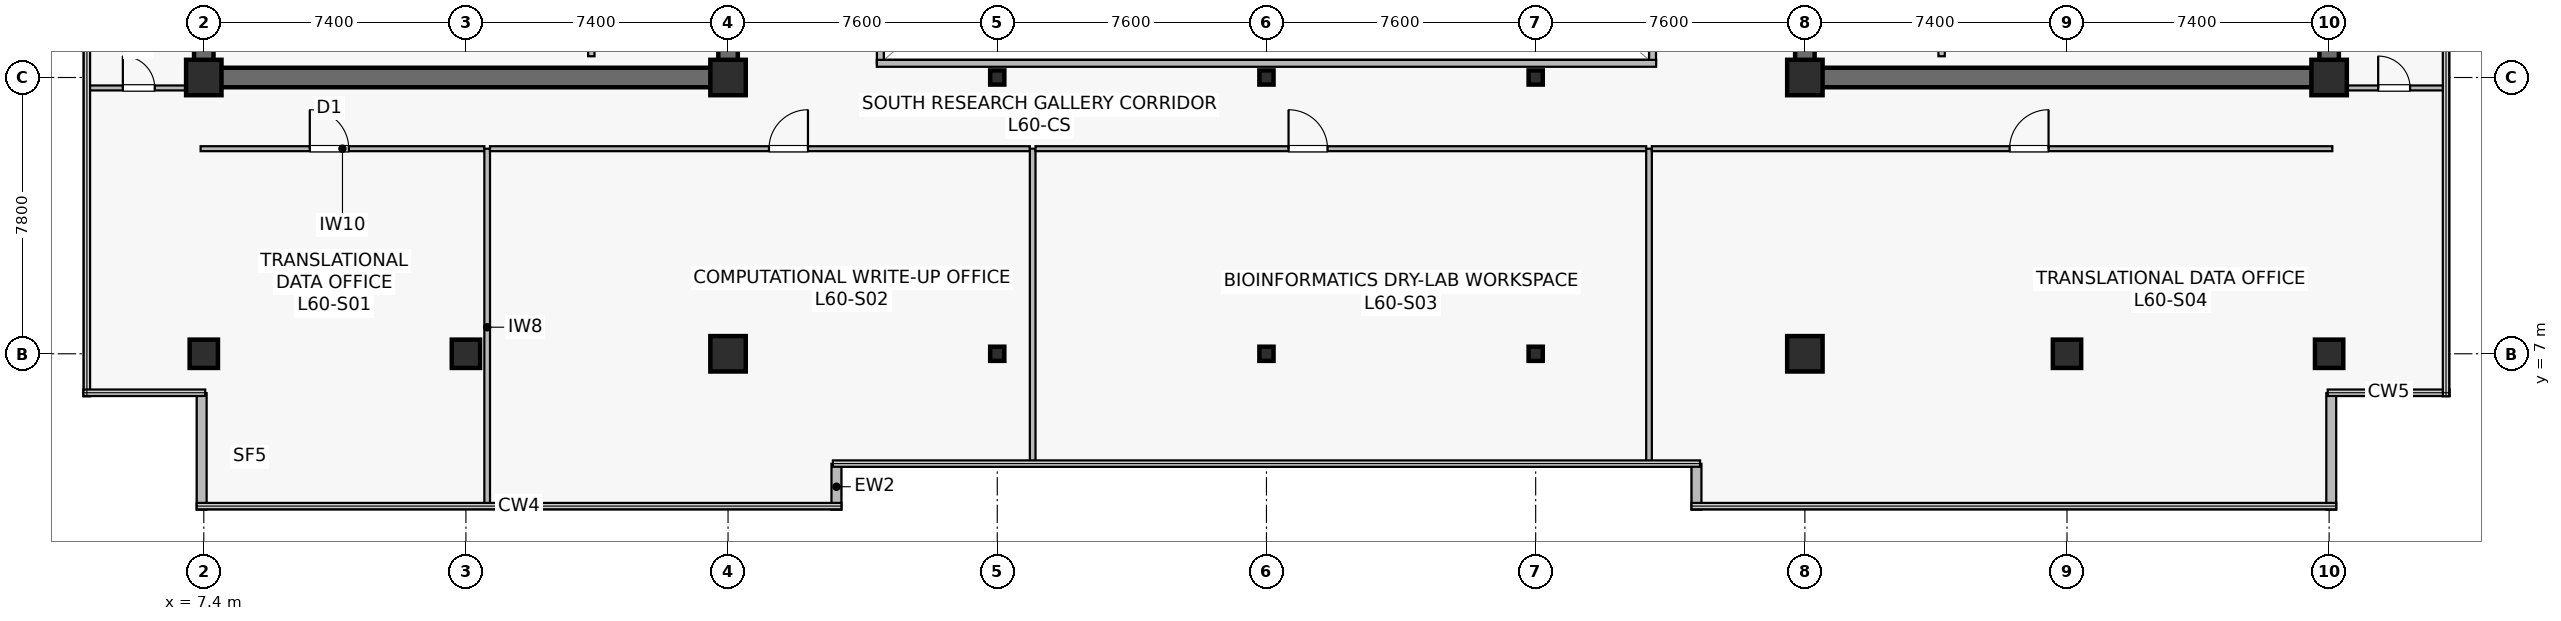
"""IFC4 building model, lengths in metres.
Left out: names, types, materials, properties, quantities, classifications, styles, units other than length and angle.
Written with IfcOpenShell. Run it as: python <this file> out.ifc"""

import sys

from ifc_helpers import new_model, si_unit, direction, frame, frame_2d, origin, origin_2d, place, context, subcontext, project, spatial, rectangle, hollow_rectangle, extrude, source, transform, mapped, element, fill, save


model = new_model("IFC4")
c1 = context("Model", 3, precision=1e-05, world=origin(), true_north=direction((0.0, 1.0)))
c2 = subcontext(c1, "Body", "Model", "MODEL_VIEW")
j1 = project(units=[si_unit("LENGTHUNIT", "METRE"), si_unit("PLANEANGLEUNIT", "RADIAN")], contexts=[c1])
p1 = place(None, origin())
s1 = spatial("IfcSite", under=j1, at=p1, CompositionType="ELEMENT")
p2 = place(p1, origin())
s2 = spatial("IfcBuilding", under=s1, at=p2, CompositionType="ELEMENT")
p3 = place(p2, frame((0.0, 0.0, 250.6)))
s3 = spatial("IfcBuildingStorey", under=s2, at=p3, CompositionType="ELEMENT", Elevation=250.6)
p4 = place(p3, frame((7.125, 14.8, 0.0), z_axis=(0.0, 0.0, 1.0), x_axis=(1.0, 0.0, 0.0)))
e1 = element("IfcWall", 1, at=p4, inside=s3, PredefinedType="SHEAR", context=c2, shape_type="SweptSolid", body=[
    extrude(rectangle(XDim=15.35, YDim=0.55, at=frame_2d((7.675, 0.0))), origin(), (0.0, 0.0, 1.0), 3.8),
])
p5 = place(p3, frame((7.4, 15.075, 0.0), z_axis=(0.0, 0.0, 1.0), x_axis=(0.0, 1.0, 0.0)))
e2 = element("IfcWall", 2, at=p5, inside=s3, PredefinedType="SHEAR", context=c2, shape_type="SweptSolid", body=[
    extrude(rectangle(XDim=18.45, YDim=0.55, at=frame_2d((9.225, 0.0))), origin(), (0.0, 0.0, 1.0), 3.8),
])
p6 = place(p3, frame((22.2, 15.075, 0.0), z_axis=(0.0, 0.0, 1.0), x_axis=(0.0, 1.0, 0.0)))
e3 = element("IfcWall", 3, at=p6, inside=s3, PredefinedType="SHEAR", context=c2, shape_type="SweptSolid", body=[
    extrude(rectangle(XDim=18.45, YDim=0.55, at=frame_2d((9.225, 0.0))), origin(), (0.0, 0.0, 1.0), 3.8),
])
p7 = place(p6, frame((3.475, 0.0, 0.0)))
e4 = element("IfcOpeningElement", 4, at=p7, cuts=e3, PredefinedType="OPENING", context=c2, shape_type="SweptSolid", body=[
    extrude(rectangle(XDim=1.42, YDim=2.2, at=frame_2d((0.71, 1.1))), frame((0.0, 0.285, 0.0), z_axis=(0.0, -1.0, 0.0), x_axis=(1.0, 0.0, 0.0)), (0.0, 0.0, 1.0), 0.57),
])
p8 = place(p3, frame((52.325, 14.8, 0.0), z_axis=(0.0, 0.0, 1.0), x_axis=(1.0, 0.0, 0.0)))
e5 = element("IfcWall", 5, at=p8, inside=s3, PredefinedType="SHEAR", context=c2, shape_type="SweptSolid", body=[
    extrude(rectangle(XDim=15.35, YDim=0.55, at=frame_2d((7.675, 0.0))), origin(), (0.0, 0.0, 1.0), 3.8),
])
p9 = place(p3, frame((52.6, 15.075, 0.0), z_axis=(0.0, 0.0, 1.0), x_axis=(0.0, 1.0, 0.0)))
e6 = element("IfcWall", 6, at=p9, inside=s3, PredefinedType="SHEAR", context=c2, shape_type="SweptSolid", body=[
    extrude(rectangle(XDim=18.45, YDim=0.55, at=frame_2d((9.225, 0.0))), origin(), (0.0, 0.0, 1.0), 3.8),
])
p10 = place(p9, frame((3.475, 0.0, 0.0)))
e7 = element("IfcOpeningElement", 7, at=p10, cuts=e6, PredefinedType="OPENING", context=c2, shape_type="SweptSolid", body=[
    extrude(rectangle(XDim=1.42, YDim=2.2, at=frame_2d((0.71, 1.1))), frame((0.0, 0.285, 0.0), z_axis=(0.0, -1.0, 0.0), x_axis=(1.0, 0.0, 0.0)), (0.0, 0.0, 1.0), 0.57),
])
p11 = place(p3, frame((67.4, 15.075, 0.0), z_axis=(0.0, 0.0, 1.0), x_axis=(0.0, 1.0, 0.0)))
e8 = element("IfcWall", 8, at=p11, inside=s3, PredefinedType="SHEAR", context=c2, shape_type="SweptSolid", body=[
    extrude(rectangle(XDim=18.45, YDim=0.55, at=frame_2d((9.225, 0.0))), origin(), (0.0, 0.0, 1.0), 3.8),
])
m1 = source(origin(), c2, "Body", "SweptSolid", [
    extrude(rectangle(XDim=0.8, YDim=0.8, at=origin_2d()), origin(), (0.0, 0.0, 1.0), 4.1),
])
p12 = place(p3, frame((14.8, 7.0, 0.0), z_axis=(0.0, 0.0, 1.0), x_axis=(1.0, 0.0, 0.0)))
e9 = element("IfcColumn", 9, at=p12, inside=s3, PredefinedType="COLUMN", context=c2, shape_type="MappedRepresentation", body=[
    mapped(m1, transform((0.0, 0.0, 0.0), scale=1.0)),
])
m2 = source(origin(), c2, "Body", "SweptSolid", [
    extrude(rectangle(XDim=1.0, YDim=1.0, at=origin_2d()), origin(), (0.0, 0.0, 1.0), 4.1),
])
for number, where, z_axis, x_axis in (
    (10, (22.2, 7.0, 0.0), (0.0, 0.0, 1.0), (1.0, 0.0, 0.0)),
    (11, (7.4, 14.8, 0.0), (0.0, 0.0, 1.0), (1.0, 0.0, 0.0)),
    (12, (22.2, 14.8, 0.0), (0.0, 0.0, 1.0), (1.0, 0.0, 0.0)),
    (13, (52.6, 7.0, 0.0), (0.0, 0.0, 1.0), (1.0, 0.0, 0.0)),
):
    element("IfcColumn", number, at=place(p3, frame(where, z_axis=z_axis, x_axis=x_axis)), inside=s3, PredefinedType="COLUMN", context=c2, shape_type="MappedRepresentation", body=[
        mapped(m2, transform((0.0, 0.0, 0.0), scale=1.0)),
    ])
p13 = place(p3, frame((60.0, 7.0, 0.0), z_axis=(0.0, 0.0, 1.0), x_axis=(1.0, 0.0, 0.0)))
e14 = element("IfcColumn", 14, at=p13, inside=s3, PredefinedType="COLUMN", context=c2, shape_type="MappedRepresentation", body=[
    mapped(m1, transform((0.0, 0.0, 0.0), scale=1.0)),
])
for number, where, z_axis, x_axis in (
    (15, (52.6, 14.8, 0.0), (0.0, 0.0, 1.0), (1.0, 0.0, 0.0)),
    (16, (67.4, 14.8, 0.0), (0.0, 0.0, 1.0), (1.0, 0.0, 0.0)),
):
    element("IfcColumn", number, at=place(p3, frame(where, z_axis=z_axis, x_axis=x_axis)), inside=s3, PredefinedType="COLUMN", context=c2, shape_type="MappedRepresentation", body=[
        mapped(m2, transform((0.0, 0.0, 0.0), scale=1.0)),
    ])
for number, where, z_axis, x_axis in (
    (17, (7.4, 7.0, 0.0), (0.0, 0.0, 1.0), (1.0, 0.0, 0.0)),
    (18, (67.4, 7.0, 0.0), (0.0, 0.0, 1.0), (1.0, 0.0, 0.0)),
):
    element("IfcColumn", number, at=place(p3, frame(where, z_axis=z_axis, x_axis=x_axis)), inside=s3, PredefinedType="COLUMN", context=c2, shape_type="MappedRepresentation", body=[
        mapped(m1, transform((0.0, 0.0, 0.0), scale=1.0)),
    ])
m3 = source(origin(), c2, "Body", "SweptSolid", [
    extrude(hollow_rectangle(XDim=0.4, YDim=0.4, WallThickness=0.019, at=origin_2d()), origin(), (0.0, 0.0, 1.0), 4.1),
])
for number, where, z_axis, x_axis in (
    (19, (29.8, 7.0, 0.0), (0.0, 0.0, 1.0), (1.0, 0.0, 0.0)),
    (20, (29.8, 14.8, 0.0), (0.0, 0.0, 1.0), (1.0, 0.0, 0.0)),
    (21, (37.4, 7.0, 0.0), (0.0, 0.0, 1.0), (1.0, 0.0, 0.0)),
    (22, (37.4, 14.8, 0.0), (0.0, 0.0, 1.0), (1.0, 0.0, 0.0)),
    (23, (45.0, 7.0, 0.0), (0.0, 0.0, 1.0), (1.0, 0.0, 0.0)),
    (24, (45.0, 14.8, 0.0), (0.0, 0.0, 1.0), (1.0, 0.0, 0.0)),
):
    element("IfcColumn", number, at=place(p3, frame(where, z_axis=z_axis, x_axis=x_axis)), inside=s3, PredefinedType="COLUMN", context=c2, shape_type="MappedRepresentation", body=[
        mapped(m3, transform((0.0, 0.0, 0.0), scale=1.0)),
    ])
for number, where, z_axis, x_axis in (
    (25, (25.26, 2.6, 0.0), (0.0, 0.0, 1.0), (0.0, 1.0, 0.0)),
    (26, (49.54, 3.893, 0.0), (0.0, 0.0, 1.0), (0.0, -1.0, 0.0)),
):
    element("IfcWall", number, at=place(p3, frame(where, z_axis=z_axis, x_axis=x_axis)), inside=s3, PredefinedType="STANDARD", context=c2, shape_type="SweptSolid", body=[
        extrude(rectangle(XDim=1.293, YDim=0.28, at=frame_2d((0.646, 0.0))), origin(), (0.0, 0.0, 1.0), 3.8),
    ])
for number, where, z_axis, x_axis in (
    (27, (67.46, 2.6, 0.0), (0.0, 0.0, 1.0), (0.0, 1.0, 0.0)),
    (28, (7.34, 5.888, 0.0), (0.0, 0.0, 1.0), (0.0, -1.0, 0.0)),
):
    element("IfcWall", number, at=place(p3, frame(where, z_axis=z_axis, x_axis=x_axis)), inside=s3, PredefinedType="STANDARD", context=c2, shape_type="SweptSolid", body=[
        extrude(rectangle(XDim=3.288, YDim=0.28, at=frame_2d((1.644, 0.0))), origin(), (0.0, 0.0, 1.0), 3.8),
    ])
for number, where, z_axis, x_axis in (
    (29, (18.34, 15.4, 0.0), (0.0, 0.0, 1.0), (0.0, 1.0, 0.0)),
    (30, (56.46, 15.4, 0.0), (0.0, 0.0, 1.0), (0.0, 1.0, 0.0)),
):
    element("IfcWall", number, at=place(p3, frame(where, z_axis=z_axis, x_axis=x_axis)), inside=s3, PredefinedType="SOLIDWALL", context=c2, shape_type="SweptSolid", body=[
        extrude(rectangle(XDim=2.4, YDim=0.18, at=frame_2d((1.2, 0.0))), origin(), (0.0, 0.0, 1.0), 3.8),
    ])
p14 = place(p3, frame((26.5, 15.2, 0.0), z_axis=(0.0, 0.0, 1.0), x_axis=(0.0, 1.0, 0.0)))
e31 = element("IfcWall", 31, at=p14, inside=s3, PredefinedType="SOLIDWALL", context=c2, shape_type="SweptSolid", body=[
    extrude(rectangle(XDim=18.2, YDim=0.195, at=frame_2d((9.1, 0.0))), origin(), (0.0, 0.0, 1.0), 3.8),
])
p15 = place(p14, frame((1.8, 0.0, 0.9)))
e32 = element("IfcOpeningElement", 32, at=p15, cuts=e31, PredefinedType="OPENING", context=c2, shape_type="SweptSolid", body=[
    extrude(rectangle(XDim=1.5, YDim=1.4, at=frame_2d((0.75, 0.7))), frame((0.0, 0.107, 0.0), z_axis=(0.0, -1.0, 0.0), x_axis=(1.0, 0.0, 0.0)), (0.0, 0.0, 1.0), 0.215),
])
p16 = place(p14, frame((13.2, 0.0, 0.9)))
e33 = element("IfcOpeningElement", 33, at=p16, cuts=e31, PredefinedType="OPENING", context=c2, shape_type="SweptSolid", body=[
    extrude(rectangle(XDim=1.5, YDim=1.4, at=frame_2d((0.75, 0.7))), frame((0.0, 0.107, 0.0), z_axis=(0.0, -1.0, 0.0), x_axis=(1.0, 0.0, 0.0)), (0.0, 0.0, 1.0), 0.215),
])
p17 = place(p3, frame((48.3, 15.2, 0.0), z_axis=(0.0, 0.0, 1.0), x_axis=(0.0, 1.0, 0.0)))
e34 = element("IfcWall", 34, at=p17, inside=s3, PredefinedType="SOLIDWALL", context=c2, shape_type="SweptSolid", body=[
    extrude(rectangle(XDim=18.2, YDim=0.195, at=frame_2d((9.1, 0.0))), origin(), (0.0, 0.0, 1.0), 3.8),
])
p18 = place(p17, frame((1.8, 0.0, 0.9)))
e35 = element("IfcOpeningElement", 35, at=p18, cuts=e34, PredefinedType="OPENING", context=c2, shape_type="SweptSolid", body=[
    extrude(rectangle(XDim=1.5, YDim=1.4, at=frame_2d((0.75, 0.7))), frame((0.0, 0.107, 0.0), z_axis=(0.0, -1.0, 0.0), x_axis=(1.0, 0.0, 0.0)), (0.0, 0.0, 1.0), 0.215),
])
p19 = place(p17, frame((13.2, 0.0, 0.9)))
e36 = element("IfcOpeningElement", 36, at=p19, cuts=e34, PredefinedType="OPENING", context=c2, shape_type="SweptSolid", body=[
    extrude(rectangle(XDim=1.5, YDim=1.4, at=frame_2d((0.75, 0.7))), frame((0.0, 0.107, 0.0), z_axis=(0.0, -1.0, 0.0), x_axis=(1.0, 0.0, 0.0)), (0.0, 0.0, 1.0), 0.215),
])
p20 = place(p3, frame((26.4, 15.2, 0.0), z_axis=(0.0, 0.0, 1.0), x_axis=(1.0, 0.0, 0.0)))
e37 = element("IfcWall", 37, at=p20, inside=s3, PredefinedType="SOLIDWALL", context=c2, shape_type="SweptSolid", body=[
    extrude(rectangle(XDim=22.0, YDim=0.195, at=frame_2d((11.0, 0.0))), origin(), (0.0, 0.0, 1.0), 3.8),
])
p21 = place(p3, frame((7.31, 12.79, 0.0), z_axis=(0.0, 0.0, 1.0), x_axis=(1.0, 0.0, 0.0)))
e38 = element("IfcWall", 38, at=p21, inside=s3, PredefinedType="PARTITIONING", context=c2, shape_type="SweptSolid", body=[
    extrude(rectangle(XDim=8.01, YDim=0.14, at=frame_2d((4.005, 0.0))), origin(), (0.0, 0.0, 1.0), 3.197),
])
p22 = place(p21, frame((3.083, 0.0, 0.0)))
e39 = element("IfcOpeningElement", 39, at=p22, cuts=e38, PredefinedType="OPENING", context=c2, shape_type="SweptSolid", body=[
    extrude(rectangle(XDim=1.1, YDim=2.18, at=frame_2d((0.55, 1.09))), frame((0.0, 0.08, 0.0), z_axis=(0.0, -1.0, 0.0), x_axis=(1.0, 0.0, 0.0)), (0.0, 0.0, 1.0), 0.16),
])
p23 = place(p3, frame((15.4, 2.71, 0.0), z_axis=(0.0, 0.0, 1.0), x_axis=(0.0, 1.0, 0.0)))
e40 = element("IfcWall", 40, at=p23, inside=s3, PredefinedType="PARTITIONING", context=c2, shape_type="SweptSolid", body=[
    extrude(rectangle(XDim=10.08, YDim=0.16, at=frame_2d((5.04, 0.0))), origin(), (0.0, 0.0, 1.0), 3.135),
])
p24 = place(p3, frame((15.48, 12.79, 0.0), z_axis=(0.0, 0.0, 1.0), x_axis=(1.0, 0.0, 0.0)))
e41 = element("IfcWall", 41, at=p24, inside=s3, PredefinedType="PARTITIONING", context=c2, shape_type="SweptSolid", body=[
    extrude(rectangle(XDim=15.24, YDim=0.14, at=frame_2d((7.62, 0.0))), origin(), (0.0, 0.0, 1.0), 3.197),
])
p25 = place(p24, frame((7.876, 0.0, 0.0)))
e42 = element("IfcOpeningElement", 42, at=p25, cuts=e41, PredefinedType="OPENING", context=c2, shape_type="SweptSolid", body=[
    extrude(rectangle(XDim=1.1, YDim=2.18, at=frame_2d((0.55, 1.09))), frame((0.0, 0.08, 0.0), z_axis=(0.0, -1.0, 0.0), x_axis=(1.0, 0.0, 0.0)), (0.0, 0.0, 1.0), 0.16),
])
p26 = place(p3, frame((30.8, 3.91, 0.0), z_axis=(0.0, 0.0, 1.0), x_axis=(0.0, 1.0, 0.0)))
e43 = element("IfcWall", 43, at=p26, inside=s3, PredefinedType="PARTITIONING", context=c2, shape_type="SweptSolid", body=[
    extrude(rectangle(XDim=8.88, YDim=0.16, at=frame_2d((4.44, 0.0))), origin(), (0.0, 0.0, 1.0), 3.135),
])
p27 = place(p3, frame((30.88, 12.79, 0.0), z_axis=(0.0, 0.0, 1.0), x_axis=(1.0, 0.0, 0.0)))
e44 = element("IfcWall", 44, at=p27, inside=s3, PredefinedType="PARTITIONING", context=c2, shape_type="SweptSolid", body=[
    extrude(rectangle(XDim=17.24, YDim=0.14, at=frame_2d((8.62, 0.0))), origin(), (0.0, 0.0, 1.0), 3.197),
])
p28 = place(p27, frame((7.144, 0.0, 0.0)))
e45 = element("IfcOpeningElement", 45, at=p28, cuts=e44, PredefinedType="OPENING", context=c2, shape_type="SweptSolid", body=[
    extrude(rectangle(XDim=1.1, YDim=2.18, at=frame_2d((0.55, 1.09))), frame((0.0, 0.08, 0.0), z_axis=(0.0, -1.0, 0.0), x_axis=(1.0, 0.0, 0.0)), (0.0, 0.0, 1.0), 0.16),
])
p29 = place(p3, frame((48.2, 3.91, 0.0), z_axis=(0.0, 0.0, 1.0), x_axis=(0.0, 1.0, 0.0)))
e46 = element("IfcWall", 46, at=p29, inside=s3, PredefinedType="PARTITIONING", context=c2, shape_type="SweptSolid", body=[
    extrude(rectangle(XDim=8.88, YDim=0.16, at=frame_2d((4.44, 0.0))), origin(), (0.0, 0.0, 1.0), 3.135),
])
p30 = place(p3, frame((48.28, 12.79, 0.0), z_axis=(0.0, 0.0, 1.0), x_axis=(1.0, 0.0, 0.0)))
e47 = element("IfcWall", 47, at=p30, inside=s3, PredefinedType="PARTITIONING", context=c2, shape_type="SweptSolid", body=[
    extrude(rectangle(XDim=19.21, YDim=0.14, at=frame_2d((9.605, 0.0))), origin(), (0.0, 0.0, 1.0), 3.197),
])
p31 = place(p30, frame((10.1, 0.0, 0.0)))
e48 = element("IfcOpeningElement", 48, at=p31, cuts=e47, PredefinedType="OPENING", context=c2, shape_type="SweptSolid", body=[
    extrude(rectangle(XDim=1.1, YDim=2.18, at=frame_2d((0.55, 1.09))), frame((0.0, 0.08, 0.0), z_axis=(0.0, -1.0, 0.0), x_axis=(1.0, 0.0, 0.0)), (0.0, 0.0, 1.0), 0.16),
])
p32 = place(p3, frame((4.11, 14.505, 0.0), z_axis=(0.0, 0.0, 1.0), x_axis=(1.0, 0.0, 0.0)))
e49 = element("IfcWall", 49, at=p32, inside=s3, PredefinedType="PARTITIONING", context=c2, shape_type="SweptSolid", body=[
    extrude(rectangle(XDim=2.91, YDim=0.14, at=frame_2d((1.455, 0.0))), origin(), (0.0, 0.0, 1.0), 3.8),
])
p33 = place(p32, frame((1.005, 0.0, 0.0)))
e50 = element("IfcOpeningElement", 50, at=p33, cuts=e49, PredefinedType="OPENING", context=c2, shape_type="SweptSolid", body=[
    extrude(rectangle(XDim=0.9, YDim=2.1, at=frame_2d((0.45, 1.05))), frame((0.0, 0.08, 0.0), z_axis=(0.0, -1.0, 0.0), x_axis=(1.0, 0.0, 0.0)), (0.0, 0.0, 1.0), 0.16),
])
p34 = place(p3, frame((67.78, 14.505, 0.0), z_axis=(0.0, 0.0, 1.0), x_axis=(1.0, 0.0, 0.0)))
e51 = element("IfcWall", 51, at=p34, inside=s3, PredefinedType="PARTITIONING", context=c2, shape_type="SweptSolid", body=[
    extrude(rectangle(XDim=2.91, YDim=0.14, at=frame_2d((1.455, 0.0))), origin(), (0.0, 0.0, 1.0), 3.8),
])
p35 = place(p34, frame((1.005, 0.0, 0.0)))
e52 = element("IfcOpeningElement", 52, at=p35, cuts=e51, PredefinedType="OPENING", context=c2, shape_type="SweptSolid", body=[
    extrude(rectangle(XDim=0.9, YDim=2.1, at=frame_2d((0.45, 1.05))), frame((0.0, 0.08, 0.0), z_axis=(0.0, -1.0, 0.0), x_axis=(1.0, 0.0, 0.0)), (0.0, 0.0, 1.0), 0.16),
])
m4 = source(origin(), c2, "Body", "SweptSolid", [
    extrude(rectangle(XDim=1.1, YDim=2.18, at=frame_2d((0.55, 1.09))), frame((0.0, 0.025, 0.0), z_axis=(0.0, -1.0, 0.0), x_axis=(1.0, 0.0, 0.0)), (0.0, 0.0, 1.0), 0.05),
])
p36 = place(p22, origin())
e53 = element("IfcDoor", 53, at=p36, inside=s3, OperationType="SINGLE_SWING_LEFT", PredefinedType="DOOR", context=c2, shape_type="MappedRepresentation", body=[
    mapped(m4, transform((0.0, 0.0, 0.0), scale=1.0)),
])
fill(e39, e53)
p37 = place(p25, origin())
e54 = element("IfcDoor", 54, at=p37, inside=s3, OperationType="SINGLE_SWING_RIGHT", PredefinedType="DOOR", context=c2, shape_type="MappedRepresentation", body=[
    mapped(m4, transform((0.0, 0.0, 0.0), scale=1.0)),
])
fill(e42, e54)
p38 = place(p28, origin())
e55 = element("IfcDoor", 55, at=p38, inside=s3, OperationType="SINGLE_SWING_LEFT", PredefinedType="DOOR", context=c2, shape_type="MappedRepresentation", body=[
    mapped(m4, transform((0.0, 0.0, 0.0), scale=1.0)),
])
fill(e45, e55)
p39 = place(p31, origin())
e56 = element("IfcDoor", 56, at=p39, inside=s3, OperationType="SINGLE_SWING_RIGHT", PredefinedType="DOOR", context=c2, shape_type="MappedRepresentation", body=[
    mapped(m4, transform((0.0, 0.0, 0.0), scale=1.0)),
])
fill(e48, e56)
m5 = source(origin(), c2, "Body", "SweptSolid", [
    extrude(rectangle(XDim=0.9, YDim=2.1, at=frame_2d((0.45, 1.05))), frame((0.0, 0.025, 0.0), z_axis=(0.0, -1.0, 0.0), x_axis=(1.0, 0.0, 0.0)), (0.0, 0.0, 1.0), 0.05),
])
p40 = place(p33, origin())
e57 = element("IfcDoor", 57, at=p40, inside=s3, OperationType="SINGLE_SWING_LEFT", PredefinedType="DOOR", context=c2, shape_type="MappedRepresentation", body=[
    mapped(m5, transform((0.0, 0.0, 0.0), scale=1.0)),
])
fill(e50, e57)
p41 = place(p35, origin())
e58 = element("IfcDoor", 58, at=p41, inside=s3, OperationType="SINGLE_SWING_LEFT", PredefinedType="DOOR", context=c2, shape_type="MappedRepresentation", body=[
    mapped(m5, transform((0.0, 0.0, 0.0), scale=1.0)),
])
fill(e52, e58)
save(model, sys.argv[1])
